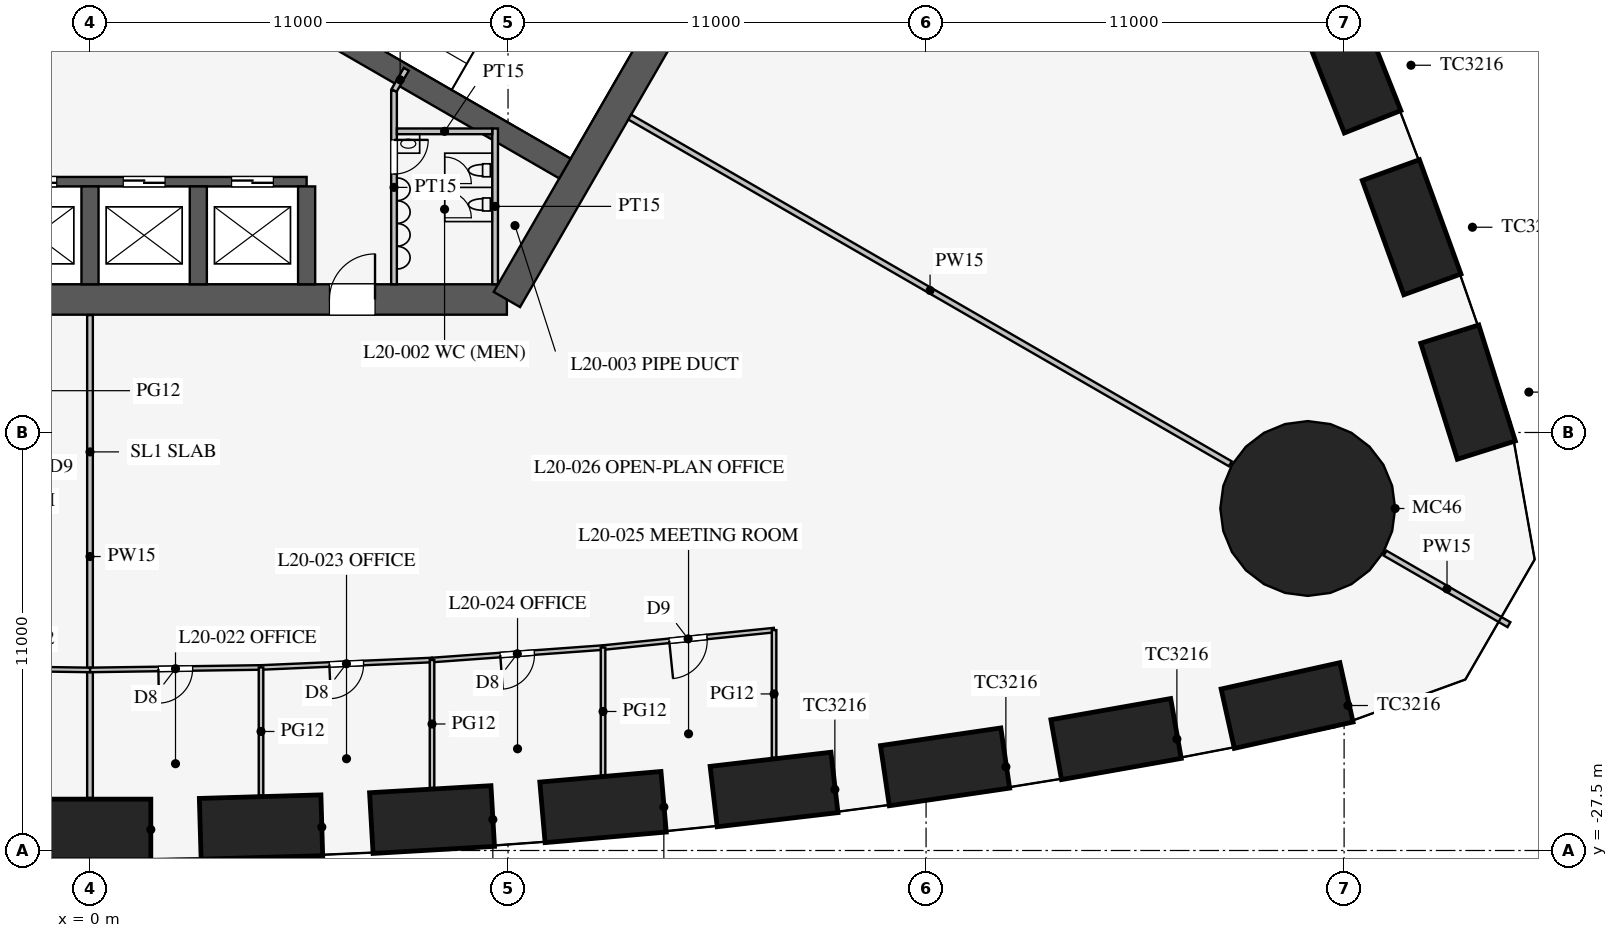
"""IFC4 building model, lengths in metres.
Left out: names, types, materials, properties, quantities, classifications, styles, units other than length and angle.
Written with IfcOpenShell. Run it as: python <this file> out.ifc"""

import sys

from ifc_helpers import new_model, si_unit, direction, frame, frame_2d, origin, origin_2d, place, context, subcontext, project, spatial, rectangle, circle, extrude, element, fill, save


model = new_model("IFC4")
c1 = context("Model", 3, precision=1e-05, world=origin(), true_north=direction((0.0, 1.0)))
c2 = subcontext(c1, "Body", "Model", "MODEL_VIEW")
j1 = project(units=[si_unit("LENGTHUNIT", "METRE"), si_unit("PLANEANGLEUNIT", "RADIAN")], contexts=[c1])
p1 = place(None, origin())
s1 = spatial("IfcSite", under=j1, at=p1, CompositionType="ELEMENT")
p2 = place(p1, origin())
s2 = spatial("IfcBuilding", under=s1, at=p2, CompositionType="ELEMENT")
p3 = place(p2, frame((0.0, 0.0, 87.9)))
s3 = spatial("IfcBuildingStorey", under=s2, at=p3, CompositionType="ELEMENT", Elevation=87.9)
for number, where, z_axis, x_axis in (
    (1, (0.0, -26.949, 0.0), (0.0, 0.0, 1.0), (1.0, 0.0, 0.0)),
    (2, (4.5, -26.883, 0.0), (0.0, 0.0, 1.0), (1.0, 0.029, 0.0)),
    (3, (9.0, -26.686, 0.0), (0.0, 0.0, 1.0), (0.998, 0.058, 0.0)),
    (4, (13.5, -26.357, 0.0), (0.0, 0.0, 1.0), (0.996, 0.087, 0.0)),
    (5, (18.0, -25.895, 0.0), (0.0, 0.0, 1.0), (0.993, 0.116, 0.0)),
    (6, (22.5, -25.299, 0.0), (0.0, 0.0, 1.0), (0.989, 0.145, 0.0)),
    (7, (27.0, -24.568, 0.0), (0.0, 0.0, 1.0), (0.985, 0.174, 0.0)),
    (8, (31.5, -23.685, 0.0), (0.0, 0.0, 1.0), (0.976, 0.217, 0.0)),
    (9, (36.262, -15.438, 0.0), (0.0, 0.0, 1.0), (-0.3, 0.954, 0.0)),
    (10, (34.776, -11.099, 0.0), (0.0, 0.0, 1.0), (-0.342, 0.94, 0.0)),
    (11, (33.16, -6.836, 0.0), (0.0, 0.0, 1.0), (-0.369, 0.929, 0.0)),
):
    element("IfcColumn", number, at=place(p3, frame(where, z_axis=z_axis, x_axis=x_axis)), inside=s3, PredefinedType="COLUMN", context=c2, shape_type="SweptSolid", body=[
        extrude(rectangle(XDim=3.2, YDim=1.6, at=origin_2d()), origin(), (0.0, 0.0, 1.0), 4.2),
    ])
p4 = place(p3, frame((32.043, -18.5, 0.0), z_axis=(0.0, 0.0, 1.0), x_axis=(1.0, 0.0, 0.0)))
e12 = element("IfcColumn", 12, at=p4, inside=s3, PredefinedType="COLUMN", context=c2, shape_type="SweptSolid", body=[
    extrude(circle(Radius=2.3, at=origin_2d()), origin(), (0.0, 0.0, 1.0), 4.2),
])
p5 = place(p3, frame((-10.97, -13.0, 0.0), z_axis=(0.0, 0.0, 1.0), x_axis=(1.0, 0.0, 0.0)))
e13 = element("IfcWall", 13, at=p5, inside=s3, PredefinedType="SHEAR", context=c2, shape_type="SweptSolid", body=[
    extrude(rectangle(XDim=21.939, YDim=0.8, at=frame_2d((10.97, 0.0))), origin(), (0.0, 0.0, 1.0), 4.2),
])
p6 = place(p5, frame((17.27, 0.0, 0.0)))
e14 = element("IfcOpeningElement", 14, at=p6, cuts=e13, PredefinedType="OPENING", context=c2, shape_type="SweptSolid", body=[
    extrude(rectangle(XDim=1.2, YDim=2.1, at=frame_2d((0.6, 1.05))), frame((0.0, 0.41, 0.0), z_axis=(0.0, -1.0, 0.0), x_axis=(1.0, 0.0, 0.0)), (0.0, 0.0, 1.0), 0.82),
])
p7 = place(p5, frame((3.47, 0.0, 0.0)))
e15 = element("IfcOpeningElement", 15, at=p7, cuts=e13, PredefinedType="OPENING", context=c2, shape_type="SweptSolid", body=[
    extrude(rectangle(XDim=1.2, YDim=2.1, at=frame_2d((0.6, 1.05))), frame((0.0, 0.41, 0.0), z_axis=(0.0, -1.0, 0.0), x_axis=(1.0, 0.0, 0.0)), (0.0, 0.0, 1.0), 0.82),
])
p8 = place(p3, frame((10.97, -13.0, 0.0), z_axis=(0.0, 0.0, 1.0), x_axis=(0.499995765644, 0.866027848477, 0.0)))
e16 = element("IfcWall", 16, at=p8, inside=s3, PredefinedType="SHEAR", context=c2, shape_type="SweptSolid", body=[
    extrude(rectangle(XDim=11.547, YDim=0.8, at=frame_2d((5.773, 0.0))), origin(), (0.0, 0.0, 1.0), 4.2),
])
p9 = place(p3, frame((-5.7, -9.9, 0.0), z_axis=(0.0, 0.0, 1.0), x_axis=(1.0, 0.0, 0.0)))
e17 = element("IfcWall", 17, at=p9, inside=s3, PredefinedType="SHEAR", context=c2, shape_type="SweptSolid", body=[
    extrude(rectangle(XDim=11.4, YDim=0.25, at=frame_2d((5.7, 0.0))), origin(), (0.0, 0.0, 1.0), 4.2),
])
p10 = place(p9, frame((0.875, 0.0, 0.0)))
e18 = element("IfcOpeningElement", 18, at=p10, cuts=e17, PredefinedType="OPENING", context=c2, shape_type="SweptSolid", body=[
    extrude(rectangle(XDim=1.1, YDim=2.2, at=frame_2d((0.55, 1.1))), frame((0.0, 0.135, 0.0), z_axis=(0.0, -1.0, 0.0), x_axis=(1.0, 0.0, 0.0)), (0.0, 0.0, 1.0), 0.27),
])
p11 = place(p9, frame((3.725, 0.0, 0.0)))
e19 = element("IfcOpeningElement", 19, at=p11, cuts=e17, PredefinedType="OPENING", context=c2, shape_type="SweptSolid", body=[
    extrude(rectangle(XDim=1.1, YDim=2.2, at=frame_2d((0.55, 1.1))), frame((0.0, 0.135, 0.0), z_axis=(0.0, -1.0, 0.0), x_axis=(1.0, 0.0, 0.0)), (0.0, 0.0, 1.0), 0.27),
])
p12 = place(p9, frame((6.575, 0.0, 0.0)))
e20 = element("IfcOpeningElement", 20, at=p12, cuts=e17, PredefinedType="OPENING", context=c2, shape_type="SweptSolid", body=[
    extrude(rectangle(XDim=1.1, YDim=2.2, at=frame_2d((0.55, 1.1))), frame((0.0, 0.135, 0.0), z_axis=(0.0, -1.0, 0.0), x_axis=(1.0, 0.0, 0.0)), (0.0, 0.0, 1.0), 0.27),
])
p13 = place(p9, frame((9.425, 0.0, 0.0)))
e21 = element("IfcOpeningElement", 21, at=p13, cuts=e17, PredefinedType="OPENING", context=c2, shape_type="SweptSolid", body=[
    extrude(rectangle(XDim=1.1, YDim=2.2, at=frame_2d((0.55, 1.1))), frame((0.0, 0.135, 0.0), z_axis=(0.0, -1.0, 0.0), x_axis=(1.0, 0.0, 0.0)), (0.0, 0.0, 1.0), 0.27),
])
for number, where, z_axis, x_axis in (
    (22, (0.0, -10.025, 0.0), (0.0, 0.0, 1.0), (0.0, -1.0, 0.0)),
    (23, (2.85, -10.025, 0.0), (0.0, 0.0, 1.0), (0.0, -1.0, 0.0)),
    (24, (5.7, -10.025, 0.0), (0.0, 0.0, 1.0), (0.0, -1.0, 0.0)),
):
    element("IfcWall", number, at=place(p3, frame(where, z_axis=z_axis, x_axis=x_axis)), inside=s3, PredefinedType="SHEAR", context=c2, shape_type="SweptSolid", body=[
        extrude(rectangle(XDim=2.575, YDim=0.45, at=frame_2d((1.288, 0.0))), origin(), (0.0, 0.0, 1.0), 4.2),
    ])
p14 = place(p3, frame((4.638, -5.016, 0.0), z_axis=(0.0, 0.0, 1.0), x_axis=(0.866019375473, -0.500010441196, 0.0)))
e25 = element("IfcWall", 25, at=p14, inside=s3, PredefinedType="SHEAR", context=c2, shape_type="SweptSolid", body=[
    extrude(rectangle(XDim=9.075, YDim=0.6, at=frame_2d((4.538, 0.0))), origin(), (0.0, 0.0, 1.0), 4.2),
])
p15 = place(p3, frame((8.0, -7.5, 0.0), z_axis=(0.0, 0.0, 1.0), x_axis=(0.0, -1.0, 0.0)))
e26 = element("IfcWall", 26, at=p15, inside=s3, PredefinedType="PARTITIONING", context=c2, shape_type="SweptSolid", body=[
    extrude(rectangle(XDim=5.1, YDim=0.15, at=frame_2d((2.55, 0.0))), origin(), (0.0, 0.0, 1.0), 3.95),
])
p16 = place(p15, frame((1.3, 0.0, 0.0)))
e27 = element("IfcOpeningElement", 27, at=p16, cuts=e26, PredefinedType="OPENING", context=c2, shape_type="SweptSolid", body=[
    extrude(rectangle(XDim=0.9, YDim=2.1, at=frame_2d((0.45, 1.05))), frame((0.0, 0.085, 0.0), z_axis=(0.0, -1.0, 0.0), x_axis=(1.0, 0.0, 0.0)), (0.0, 0.0, 1.0), 0.17),
])
p17 = place(p3, frame((8.0, -7.5, 0.0), z_axis=(0.0, 0.0, 1.0), x_axis=(0.499842556608, 0.866116284689, 0.0)))
e28 = element("IfcWall", 28, at=p17, inside=s3, PredefinedType="PARTITIONING", context=c2, shape_type="SweptSolid", body=[
    extrude(rectangle(XDim=0.645, YDim=0.15, at=frame_2d((0.323, 0.0))), origin(), (0.0, 0.0, 1.0), 3.95),
])
p18 = place(p3, frame((10.66, -8.5, 0.0), z_axis=(0.0, 0.0, 1.0), x_axis=(0.0, -1.0, 0.0)))
e29 = element("IfcWall", 29, at=p18, inside=s3, PredefinedType="PARTITIONING", context=c2, shape_type="SweptSolid", body=[
    extrude(rectangle(XDim=4.1, YDim=0.15, at=frame_2d((2.05, 0.0))), origin(), (0.0, 0.0, 1.0), 3.95),
])
p19 = place(p3, frame((8.075, -8.575, 0.0), z_axis=(0.0, 0.0, 1.0), x_axis=(1.0, 0.0, 0.0)))
e30 = element("IfcWall", 30, at=p19, inside=s3, PredefinedType="PARTITIONING", context=c2, shape_type="SweptSolid", body=[
    extrude(rectangle(XDim=2.51, YDim=0.15, at=frame_2d((1.255, 0.0))), origin(), (0.0, 0.0, 1.0), 3.95),
])
p20 = place(p3, frame((14.203, -8.2, 0.0), z_axis=(0.0, 0.0, 1.0), x_axis=(0.866024965723, -0.500000758745, 0.0)))
e31 = element("IfcWall", 31, at=p20, inside=s3, PredefinedType="PARTITIONING", context=c2, shape_type="SweptSolid", body=[
    extrude(rectangle(XDim=18.25, YDim=0.15, at=frame_2d((9.125, 0.0))), origin(), (0.0, 0.0, 1.0), 1.95),
])
p21 = place(p3, frame((34.078, -19.675, 0.0), z_axis=(0.0, 0.0, 1.0), x_axis=(0.866019247219, -0.500010663332, 0.0)))
e32 = element("IfcWall", 32, at=p21, inside=s3, PredefinedType="PARTITIONING", context=c2, shape_type="SweptSolid", body=[
    extrude(rectangle(XDim=3.764, YDim=0.15, at=frame_2d((1.882, 0.0))), origin(), (0.0, 0.0, 1.0), 1.95),
])
p22 = place(p3, frame((0.0, -13.41, 0.0), z_axis=(0.0, 0.0, 1.0), x_axis=(0.0, -1.0, 0.0)))
e33 = element("IfcWall", 33, at=p22, inside=s3, PredefinedType="PARTITIONING", context=c2, shape_type="SweptSolid", body=[
    extrude(rectangle(XDim=12.709, YDim=0.15, at=frame_2d((6.354, 0.0))), origin(), (0.0, 0.0, 1.0), 2.15),
])
p23 = place(p3, frame((0.0, -22.749, 0.0), z_axis=(0.0, 0.0, 1.0), x_axis=(0.999894311967, 0.014538393859, 0.0)))
e34 = element("IfcWall", 34, at=p23, inside=s3, PredefinedType="PARTITIONING", context=c2, shape_type="SweptSolid", body=[
    extrude(rectangle(XDim=4.5, YDim=0.12, at=frame_2d((2.25, 0.0))), origin(), (0.0, 0.0, 1.0), 2.9),
])
p24 = place(p23, frame((1.8, 0.0, 0.15)))
e35 = element("IfcOpeningElement", 35, at=p24, cuts=e34, PredefinedType="OPENING", context=c2, shape_type="SweptSolid", body=[
    extrude(rectangle(XDim=0.9, YDim=2.1, at=frame_2d((0.45, 1.05))), frame((0.0, 0.07, 0.0), z_axis=(0.0, -1.0, 0.0), x_axis=(1.0, 0.0, 0.0)), (0.0, 0.0, 1.0), 0.14),
])
p25 = place(p3, frame((13.5, -22.16, 0.0), z_axis=(0.0, 0.0, 1.0), x_axis=(0.994833141332, 0.101523499286, 0.0)))
e36 = element("IfcWall", 36, at=p25, inside=s3, PredefinedType="PARTITIONING", context=c2, shape_type="SweptSolid", body=[
    extrude(rectangle(XDim=4.523, YDim=0.12, at=frame_2d((2.262, 0.0))), origin(), (0.0, 0.0, 1.0), 2.9),
])
p26 = place(p25, frame((1.75, 0.0, 0.15)))
e37 = element("IfcOpeningElement", 37, at=p26, cuts=e36, PredefinedType="OPENING", context=c2, shape_type="SweptSolid", body=[
    extrude(rectangle(XDim=1.0, YDim=2.1, at=frame_2d((0.5, 1.05))), frame((0.0, 0.07, 0.0), z_axis=(0.0, -1.0, 0.0), x_axis=(1.0, 0.0, 0.0)), (0.0, 0.0, 1.0), 0.14),
])
p27 = place(p3, frame((4.5, -22.683, 0.0), z_axis=(0.0, 0.0, 1.0), x_axis=(0.999052370647, 0.043524254212, 0.0)))
e38 = element("IfcWall", 38, at=p27, inside=s3, PredefinedType="PARTITIONING", context=c2, shape_type="SweptSolid", body=[
    extrude(rectangle(XDim=4.504, YDim=0.12, at=frame_2d((2.252, 0.0))), origin(), (0.0, 0.0, 1.0), 2.9),
])
p28 = place(p27, frame((1.8, 0.0, 0.15)))
e39 = element("IfcOpeningElement", 39, at=p28, cuts=e38, PredefinedType="OPENING", context=c2, shape_type="SweptSolid", body=[
    extrude(rectangle(XDim=0.9, YDim=2.1, at=frame_2d((0.45, 1.05))), frame((0.0, 0.07, 0.0), z_axis=(0.0, -1.0, 0.0), x_axis=(1.0, 0.0, 0.0)), (0.0, 0.0, 1.0), 0.14),
])
p29 = place(p3, frame((9.0, -22.487, 0.0), z_axis=(0.0, 0.0, 1.0), x_axis=(0.997363894896, 0.072562119306, 0.0)))
e40 = element("IfcWall", 40, at=p29, inside=s3, PredefinedType="PARTITIONING", context=c2, shape_type="SweptSolid", body=[
    extrude(rectangle(XDim=4.512, YDim=0.12, at=frame_2d((2.256, 0.0))), origin(), (0.0, 0.0, 1.0), 2.9),
])
p30 = place(p29, frame((1.8, 0.0, 0.15)))
e41 = element("IfcOpeningElement", 41, at=p30, cuts=e40, PredefinedType="OPENING", context=c2, shape_type="SweptSolid", body=[
    extrude(rectangle(XDim=0.9, YDim=2.1, at=frame_2d((0.45, 1.05))), frame((0.0, 0.07, 0.0), z_axis=(0.0, -1.0, 0.0), x_axis=(1.0, 0.0, 0.0)), (0.0, 0.0, 1.0), 0.14),
])
p31 = place(p3, frame((-4.5, -22.683, 0.0), z_axis=(0.0, 0.0, 1.0), x_axis=(0.999894311967, -0.014538393859, 0.0)))
e42 = element("IfcWall", 42, at=p31, inside=s3, PredefinedType="PARTITIONING", context=c2, shape_type="SweptSolid", body=[
    extrude(rectangle(XDim=4.5, YDim=0.12, at=frame_2d((2.25, 0.0))), origin(), (0.0, 0.0, 1.0), 2.9),
])
p32 = place(p31, frame((1.8, 0.0, 0.15)))
e43 = element("IfcOpeningElement", 43, at=p32, cuts=e42, PredefinedType="OPENING", context=c2, shape_type="SweptSolid", body=[
    extrude(rectangle(XDim=0.9, YDim=2.1, at=frame_2d((0.45, 1.05))), frame((0.0, 0.07, 0.0), z_axis=(0.0, -1.0, 0.0), x_axis=(1.0, 0.0, 0.0)), (0.0, 0.0, 1.0), 0.14),
])
p33 = place(p3, frame((13.5, -22.16, 0.0), z_axis=(0.0, 0.0, 1.0), x_axis=(0.0, -1.0, 0.0)))
e44 = element("IfcWall", 44, at=p33, inside=s3, PredefinedType="PARTITIONING", context=c2, shape_type="SweptSolid", body=[
    extrude(rectangle(XDim=3.364, YDim=0.12, at=frame_2d((1.682, 0.0))), origin(), (0.0, 0.0, 1.0), 2.15),
])
p34 = place(p3, frame((18.0, -21.701, 0.0), z_axis=(0.0, 0.0, 1.0), x_axis=(0.0, -1.0, 0.0)))
e45 = element("IfcWall", 45, at=p34, inside=s3, PredefinedType="PARTITIONING", context=c2, shape_type="SweptSolid", body=[
    extrude(rectangle(XDim=3.359, YDim=0.12, at=frame_2d((1.679, 0.0))), origin(), (0.0, 0.0, 1.0), 2.15),
])
p35 = place(p3, frame((4.5, -22.683, 0.0), z_axis=(0.0, 0.0, 1.0), x_axis=(0.0, -1.0, 0.0)))
e46 = element("IfcWall", 46, at=p35, inside=s3, PredefinedType="PARTITIONING", context=c2, shape_type="SweptSolid", body=[
    extrude(rectangle(XDim=3.369, YDim=0.12, at=frame_2d((1.685, 0.0))), origin(), (0.0, 0.0, 1.0), 2.15),
])
p36 = place(p3, frame((9.0, -22.487, 0.0), z_axis=(0.0, 0.0, 1.0), x_axis=(0.0, -1.0, 0.0)))
e47 = element("IfcWall", 47, at=p36, inside=s3, PredefinedType="PARTITIONING", context=c2, shape_type="SweptSolid", body=[
    extrude(rectangle(XDim=3.367, YDim=0.12, at=frame_2d((1.684, 0.0))), origin(), (0.0, 0.0, 1.0), 2.15),
])
p37 = place(p16, origin())
e48 = element("IfcDoor", 48, at=p37, inside=s3, OperationType="SINGLE_SWING_LEFT", PredefinedType="DOOR", context=c2, shape_type="SweptSolid", body=[
    extrude(rectangle(XDim=0.9, YDim=2.1, at=frame_2d((0.45, 1.05))), frame((0.0, 0.025, 0.0), z_axis=(0.0, -1.0, 0.0), x_axis=(1.0, 0.0, 0.0)), (0.0, 0.0, 1.0), 0.05),
])
fill(e27, e48)
p38 = place(p6, origin())
e49 = element("IfcDoor", 49, at=p38, inside=s3, OperationType="SINGLE_SWING_RIGHT", PredefinedType="DOOR", context=c2, shape_type="SweptSolid", body=[
    extrude(rectangle(XDim=1.2, YDim=2.1, at=frame_2d((0.6, 1.05))), frame((0.0, 0.025, 0.0), z_axis=(0.0, -1.0, 0.0), x_axis=(1.0, 0.0, 0.0)), (0.0, 0.0, 1.0), 0.05),
])
fill(e14, e49)
p39 = place(p24, frame((0.9, 0.0, 0.0), z_axis=(0.0, 0.0, 1.0), x_axis=(-1.0, 0.0, 0.0)))
e50 = element("IfcDoor", 50, at=p39, inside=s3, OperationType="SINGLE_SWING_RIGHT", PredefinedType="DOOR", context=c2, shape_type="SweptSolid", body=[
    extrude(rectangle(XDim=0.9, YDim=2.1, at=frame_2d((0.45, 1.05))), frame((0.0, 0.025, 0.0), z_axis=(0.0, -1.0, 0.0), x_axis=(1.0, 0.0, 0.0)), (0.0, 0.0, 1.0), 0.05),
])
fill(e35, e50)
p40 = place(p28, frame((0.9, 0.0, 0.0), z_axis=(0.0, 0.0, 1.0), x_axis=(-1.0, 0.0, 0.0)))
e51 = element("IfcDoor", 51, at=p40, inside=s3, OperationType="SINGLE_SWING_RIGHT", PredefinedType="DOOR", context=c2, shape_type="SweptSolid", body=[
    extrude(rectangle(XDim=0.9, YDim=2.1, at=frame_2d((0.45, 1.05))), frame((0.0, 0.025, 0.0), z_axis=(0.0, -1.0, 0.0), x_axis=(1.0, 0.0, 0.0)), (0.0, 0.0, 1.0), 0.05),
])
fill(e39, e51)
p41 = place(p30, frame((0.9, 0.0, 0.0), z_axis=(0.0, 0.0, 1.0), x_axis=(-1.0, 0.0, 0.0)))
e52 = element("IfcDoor", 52, at=p41, inside=s3, OperationType="SINGLE_SWING_RIGHT", PredefinedType="DOOR", context=c2, shape_type="SweptSolid", body=[
    extrude(rectangle(XDim=0.9, YDim=2.1, at=frame_2d((0.45, 1.05))), frame((0.0, 0.025, 0.0), z_axis=(0.0, -1.0, 0.0), x_axis=(1.0, 0.0, 0.0)), (0.0, 0.0, 1.0), 0.05),
])
fill(e41, e52)
p42 = place(p26, frame((1.0, 0.0, 0.0), z_axis=(0.0, 0.0, 1.0), x_axis=(-1.0, 0.0, 0.0)))
e53 = element("IfcDoor", 53, at=p42, inside=s3, OperationType="SINGLE_SWING_RIGHT", PredefinedType="DOOR", context=c2, shape_type="SweptSolid", body=[
    extrude(rectangle(XDim=1.0, YDim=2.1, at=frame_2d((0.5, 1.05))), frame((0.0, 0.025, 0.0), z_axis=(0.0, -1.0, 0.0), x_axis=(1.0, 0.0, 0.0)), (0.0, 0.0, 1.0), 0.05),
])
fill(e37, e53)
p43 = place(p11, origin())
e54 = element("IfcDoor", 54, at=p43, inside=s3, OperationType="DOUBLE_DOOR_SLIDING", PredefinedType="DOOR", context=c2, shape_type="SweptSolid", body=[
    extrude(rectangle(XDim=1.1, YDim=2.2, at=frame_2d((0.55, 1.1))), frame((0.0, 0.025, 0.0), z_axis=(0.0, -1.0, 0.0), x_axis=(1.0, 0.0, 0.0)), (0.0, 0.0, 1.0), 0.05),
])
fill(e19, e54)
p44 = place(p12, origin())
e55 = element("IfcDoor", 55, at=p44, inside=s3, OperationType="DOUBLE_DOOR_SLIDING", PredefinedType="DOOR", context=c2, shape_type="SweptSolid", body=[
    extrude(rectangle(XDim=1.1, YDim=2.2, at=frame_2d((0.55, 1.1))), frame((0.0, 0.025, 0.0), z_axis=(0.0, -1.0, 0.0), x_axis=(1.0, 0.0, 0.0)), (0.0, 0.0, 1.0), 0.05),
])
fill(e20, e55)
p45 = place(p13, origin())
e56 = element("IfcDoor", 56, at=p45, inside=s3, OperationType="DOUBLE_DOOR_SLIDING", PredefinedType="DOOR", context=c2, shape_type="SweptSolid", body=[
    extrude(rectangle(XDim=1.1, YDim=2.2, at=frame_2d((0.55, 1.1))), frame((0.0, 0.025, 0.0), z_axis=(0.0, -1.0, 0.0), x_axis=(1.0, 0.0, 0.0)), (0.0, 0.0, 1.0), 0.05),
])
fill(e21, e56)
save(model, sys.argv[1])
